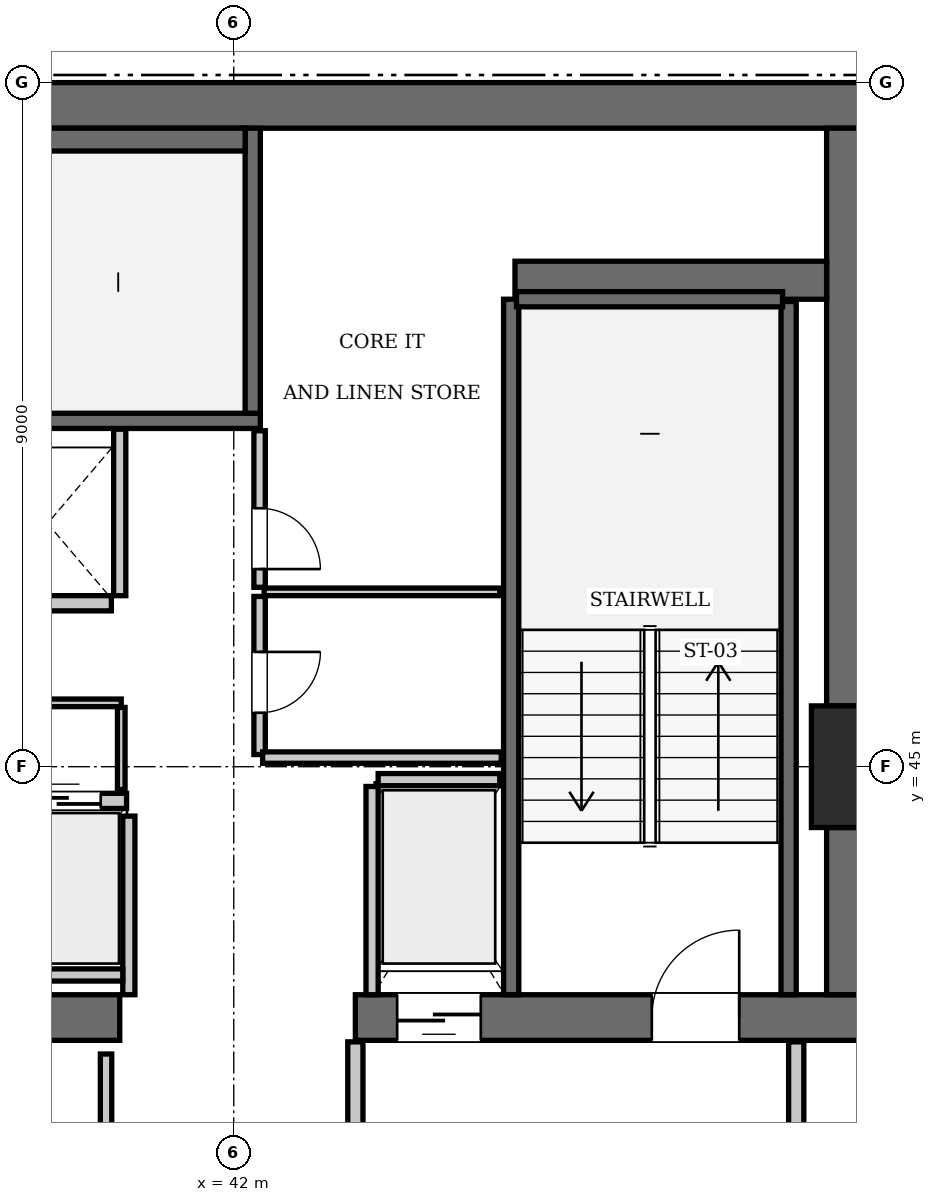
"""IFC4 building model, lengths in metres.
Left out: names, types, materials, properties, quantities, classifications, styles, units other than length and angle.
Written with IfcOpenShell. Run it as: python <this file> out.ifc"""

import sys

from ifc_helpers import new_model, si_unit, direction, frame, frame_2d, origin, origin_2d, place, context, subcontext, project, spatial, rectangle, extrude, element, fill, save


model = new_model("IFC4")
c1 = context("Model", 3, precision=1e-05, world=origin(), true_north=direction((0.0, 1.0)))
c2 = subcontext(c1, "Body", "Model", "MODEL_VIEW")
j1 = project(units=[si_unit("LENGTHUNIT", "METRE"), si_unit("PLANEANGLEUNIT", "RADIAN")], contexts=[c1])
p1 = place(None, origin())
s1 = spatial("IfcSite", under=j1, at=p1, CompositionType="ELEMENT")
p2 = place(p1, origin())
s2 = spatial("IfcBuilding", under=s1, at=p2, CompositionType="ELEMENT")
p3 = place(p2, frame((0.0, 0.0, 258.65)))
s3 = spatial("IfcBuildingStorey", under=s2, at=p3, CompositionType="ELEMENT", Elevation=258.65)
p4 = place(p3, frame((50.4, 45.0, 0.0), z_axis=(0.0, 0.0, 1.0), x_axis=(1.0, 0.0, 0.0)))
e1 = element("IfcColumn", 1, at=p4, inside=s3, PredefinedType="COLUMN", context=c2, shape_type="SweptSolid", body=[
    extrude(rectangle(XDim=1.6, YDim=1.6, at=origin_2d()), origin(), (0.0, 0.0, 1.0), 3.85),
])
p5 = place(p3, frame((25.2, 53.7, 0.0), z_axis=(0.0, 0.0, 1.0), x_axis=(1.0, 0.0, 0.0)))
e2 = element("IfcWall", 2, at=p5, inside=s3, PredefinedType="SHEAR", context=c2, shape_type="SweptSolid", body=[
    extrude(rectangle(XDim=25.2, YDim=0.6, at=frame_2d((12.6, 0.0))), origin(), (0.0, 0.0, 1.0), 3.85),
])
p6 = place(p3, frame((35.1, 41.7, 0.0), z_axis=(0.0, 0.0, 1.0), x_axis=(1.0, 0.0, 0.0)))
e3 = element("IfcWall", 3, at=p6, inside=s3, PredefinedType="SHEAR", context=c2, shape_type="SweptSolid", body=[
    extrude(rectangle(XDim=5.4, YDim=0.6, at=frame_2d((2.7, 0.0))), origin(), (0.0, 0.0, 1.0), 3.85),
])
p7 = place(p3, frame((43.6, 41.7, 0.0), z_axis=(0.0, 0.0, 1.0), x_axis=(1.0, 0.0, 0.0)))
e4 = element("IfcWall", 4, at=p7, inside=s3, PredefinedType="SHEAR", context=c2, shape_type="SweptSolid", body=[
    extrude(rectangle(XDim=6.8, YDim=0.6, at=frame_2d((3.4, 0.0))), origin(), (0.0, 0.0, 1.0), 3.85),
])
p8 = place(p7, frame((3.9, 0.0, 0.0)))
e5 = element("IfcOpeningElement", 5, at=p8, cuts=e4, PredefinedType="OPENING", context=c2, shape_type="SweptSolid", body=[
    extrude(rectangle(XDim=1.15, YDim=2.15, at=frame_2d((0.575, 1.075))), frame((0.0, 0.31, 0.0), z_axis=(0.0, -1.0, 0.0), x_axis=(1.0, 0.0, 0.0)), (0.0, 0.0, 1.0), 0.62),
])
p9 = place(p7, frame((0.55, 0.0, 0.0)))
e6 = element("IfcOpeningElement", 6, at=p9, cuts=e4, PredefinedType="OPENING", context=c2, shape_type="SweptSolid", body=[
    extrude(rectangle(XDim=1.1, YDim=2.2, at=frame_2d((0.55, 1.1))), frame((0.0, 0.31, 0.0), z_axis=(0.0, -1.0, 0.0), x_axis=(1.0, 0.0, 0.0)), (0.0, 0.0, 1.0), 0.62),
])
p10 = place(p3, frame((50.1, 42.0, 0.0), z_axis=(0.0, 0.0, 1.0), x_axis=(0.0, 1.0, 0.0)))
e7 = element("IfcWall", 7, at=p10, inside=s3, PredefinedType="SHEAR", context=c2, shape_type="SweptSolid", body=[
    extrude(rectangle(XDim=2.2, YDim=0.6, at=frame_2d((1.1, 0.0))), origin(), (0.0, 0.0, 1.0), 3.85),
])
p11 = place(p3, frame((50.1, 45.8, 0.0), z_axis=(0.0, 0.0, 1.0), x_axis=(0.0, 1.0, 0.0)))
e8 = element("IfcWall", 8, at=p11, inside=s3, PredefinedType="SHEAR", context=c2, shape_type="SweptSolid", body=[
    extrude(rectangle(XDim=7.6, YDim=0.6, at=frame_2d((3.8, 0.0))), origin(), (0.0, 0.0, 1.0), 3.85),
])
p12 = place(p3, frame((45.7, 51.4, 0.0), z_axis=(0.0, 0.0, 1.0), x_axis=(1.0, 0.0, 0.0)))
e9 = element("IfcWall", 9, at=p12, inside=s3, PredefinedType="SHEAR", context=c2, shape_type="SweptSolid", body=[
    extrude(rectangle(XDim=4.1, YDim=0.5, at=frame_2d((2.05, 0.0))), origin(), (0.0, 0.0, 1.0), 3.85),
])
p13 = place(p3, frame((33.25, 49.55, 0.0), z_axis=(0.0, 0.0, 1.0), x_axis=(1.0, 0.0, 0.0)))
e10 = element("IfcWall", 10, at=p13, inside=s3, PredefinedType="SOLIDWALL", context=c2, shape_type="SweptSolid", body=[
    extrude(rectangle(XDim=9.1, YDim=0.2, at=frame_2d((4.55, 0.0))), origin(), (0.0, 0.0, 1.0), 3.61),
])
p14 = place(p3, frame((42.25, 49.65, 0.0), z_axis=(0.0, 0.0, 1.0), x_axis=(0.0, 1.0, 0.0)))
e11 = element("IfcWall", 11, at=p14, inside=s3, PredefinedType="SOLIDWALL", context=c2, shape_type="SweptSolid", body=[
    extrude(rectangle(XDim=3.75, YDim=0.2, at=frame_2d((1.875, 0.0))), origin(), (0.0, 0.0, 1.0), 3.61),
])
p15 = place(p3, frame((33.45, 53.25, 0.0), z_axis=(0.0, 0.0, 1.0), x_axis=(1.0, 0.0, 0.0)))
e12 = element("IfcWall", 12, at=p15, inside=s3, PredefinedType="SOLIDWALL", context=c2, shape_type="SweptSolid", body=[
    extrude(rectangle(XDim=8.7, YDim=0.3, at=frame_2d((4.35, 0.0))), origin(), (0.0, 0.0, 1.0), 3.61),
])
p16 = place(p3, frame((45.65, 42.0, 0.0), z_axis=(0.0, 0.0, 1.0), x_axis=(0.0, 1.0, 0.0)))
e13 = element("IfcWall", 13, at=p16, inside=s3, PredefinedType="SOLIDWALL", context=c2, shape_type="SweptSolid", body=[
    extrude(rectangle(XDim=9.15, YDim=0.2, at=frame_2d((4.575, 0.0))), origin(), (0.0, 0.0, 1.0), 3.61),
])
p17 = place(p3, frame((49.3, 42.0, 0.0), z_axis=(0.0, 0.0, 1.0), x_axis=(0.0, 1.0, 0.0)))
e14 = element("IfcWall", 14, at=p17, inside=s3, PredefinedType="SOLIDWALL", context=c2, shape_type="SweptSolid", body=[
    extrude(rectangle(XDim=9.12, YDim=0.2, at=frame_2d((4.56, 0.0))), origin(), (0.0, 0.0, 1.0), 3.61),
])
p18 = place(p3, frame((45.72, 51.15, 0.0), z_axis=(0.0, 0.0, 1.0), x_axis=(1.0, 0.0, 0.0)))
e15 = element("IfcWall", 15, at=p18, inside=s3, PredefinedType="SOLIDWALL", context=c2, shape_type="SweptSolid", body=[
    extrude(rectangle(XDim=3.5, YDim=0.2, at=frame_2d((1.75, 0.0))), origin(), (0.0, 0.0, 1.0), 3.61),
])
p19 = place(p3, frame((38.91, 44.55, 0.0), z_axis=(0.0, 0.0, 1.0), x_axis=(1.0, 0.0, 0.0)))
e16 = element("IfcWall", 16, at=p19, inside=s3, PredefinedType="SOLIDWALL", context=c2, shape_type="SweptSolid", body=[
    extrude(rectangle(XDim=1.68, YDim=0.2, at=frame_2d((0.84, 0.0))), origin(), (0.0, 0.0, 1.0), 3.61),
])
p20 = place(p19, frame((0.34, 0.0, 0.0)))
e17 = element("IfcOpeningElement", 17, at=p20, cuts=e16, PredefinedType="OPENING", context=c2, shape_type="SweptSolid", body=[
    extrude(rectangle(XDim=1.0, YDim=2.15, at=frame_2d((0.5, 1.075))), frame((0.0, 0.11, 0.0), z_axis=(0.0, -1.0, 0.0), x_axis=(1.0, 0.0, 0.0)), (0.0, 0.0, 1.0), 0.22),
])
p21 = place(p3, frame((38.71, 47.15, 0.0), z_axis=(0.0, 0.0, 1.0), x_axis=(1.0, 0.0, 0.0)))
e18 = element("IfcWall", 18, at=p21, inside=s3, PredefinedType="SOLIDWALL", context=c2, shape_type="SweptSolid", body=[
    extrude(rectangle(XDim=1.68, YDim=0.2, at=frame_2d((0.84, 0.0))), origin(), (0.0, 0.0, 1.0), 3.61),
])
p22 = place(p3, frame((43.9, 44.83, 0.0), z_axis=(0.0, 0.0, 1.0), x_axis=(1.0, 0.0, 0.0)))
e19 = element("IfcWall", 19, at=p22, inside=s3, PredefinedType="SOLIDWALL", context=c2, shape_type="SweptSolid", body=[
    extrude(rectangle(XDim=1.6, YDim=0.16, at=frame_2d((0.8, 0.0))), origin(), (0.0, 0.0, 1.0), 3.61),
])
p23 = place(p3, frame((43.82, 42.0, 0.0), z_axis=(0.0, 0.0, 1.0), x_axis=(0.0, 1.0, 0.0)))
e20 = element("IfcWall", 20, at=p23, inside=s3, PredefinedType="SOLIDWALL", context=c2, shape_type="SweptSolid", body=[
    extrude(rectangle(XDim=2.74, YDim=0.16, at=frame_2d((1.37, 0.0))), origin(), (0.0, 0.0, 1.0), 3.61),
])
p24 = place(p3, frame((40.62, 42.0, 0.0), z_axis=(0.0, 0.0, 1.0), x_axis=(0.0, 1.0, 0.0)))
e21 = element("IfcWall", 21, at=p24, inside=s3, PredefinedType="SOLIDWALL", context=c2, shape_type="SweptSolid", body=[
    extrude(rectangle(XDim=2.35, YDim=0.16, at=frame_2d((1.175, 0.0))), origin(), (0.0, 0.0, 1.0), 3.61),
])
p25 = place(p3, frame((35.52, 42.26, 0.0), z_axis=(0.0, 0.0, 1.0), x_axis=(1.0, 0.0, 0.0)))
e22 = element("IfcWall", 22, at=p25, inside=s3, PredefinedType="SOLIDWALL", context=c2, shape_type="SweptSolid", body=[
    extrude(rectangle(XDim=5.02, YDim=0.16, at=frame_2d((2.51, 0.0))), origin(), (0.0, 0.0, 1.0), 3.61),
])
p26 = place(p3, frame((40.5, 47.25, 0.0), z_axis=(0.0, 0.0, 1.0), x_axis=(0.0, 1.0, 0.0)))
e23 = element("IfcWall", 23, at=p26, inside=s3, PredefinedType="SOLIDWALL", context=c2, shape_type="SweptSolid", body=[
    extrude(rectangle(XDim=2.19, YDim=0.16, at=frame_2d((1.095, 0.0))), origin(), (0.0, 0.0, 1.0), 3.61),
])
for number, where, z_axis, x_axis in (
    (24, (43.6, 38.31, 0.0), (0.0, 0.0, 1.0), (0.0, 1.0, 0.0)),
    (25, (49.4, 38.31, 0.0), (0.0, 0.0, 1.0), (0.0, 1.0, 0.0)),
):
    element("IfcWall", number, at=place(p3, frame(where, z_axis=z_axis, x_axis=x_axis)), inside=s3, PredefinedType="PARTITIONING", context=c2, shape_type="SweptSolid", body=[
        extrude(rectangle(XDim=3.07, YDim=0.2, at=frame_2d((1.535, 0.0))), origin(), (0.0, 0.0, 1.0), 3.61),
    ])
p27 = place(p3, frame((35.58, 45.84, 0.0), z_axis=(0.0, 0.0, 1.0), x_axis=(1.0, 0.0, 0.0)))
e26 = element("IfcWall", 26, at=p27, inside=s3, PredefinedType="PARTITIONING", context=c2, shape_type="SweptSolid", body=[
    extrude(rectangle(XDim=4.94, YDim=0.1, at=frame_2d((2.47, 0.0))), origin(), (0.0, 0.0, 1.0), 3.61),
])
p28 = place(p27, frame((1.8, 0.0, 0.0)))
e27 = element("IfcOpeningElement", 27, at=p28, cuts=e26, PredefinedType="OPENING", context=c2, shape_type="SweptSolid", body=[
    extrude(rectangle(XDim=0.8, YDim=2.05, at=frame_2d((0.4, 1.025))), frame((0.0, 0.06, 0.0), z_axis=(0.0, -1.0, 0.0), x_axis=(1.0, 0.0, 0.0)), (0.0, 0.0, 1.0), 0.12),
])
p29 = place(p3, frame((40.52, 44.7, 0.0), z_axis=(0.0, 0.0, 1.0), x_axis=(0.0, 1.0, 0.0)))
e28 = element("IfcWall", 28, at=p29, inside=s3, PredefinedType="PARTITIONING", context=c2, shape_type="SweptSolid", body=[
    extrude(rectangle(XDim=1.08, YDim=0.1, at=frame_2d((0.54, 0.0))), origin(), (0.0, 0.0, 1.0), 3.61),
])
p30 = place(p3, frame((42.34, 45.16, 0.0), z_axis=(0.0, 0.0, 1.0), x_axis=(0.0, 1.0, 0.0)))
e29 = element("IfcWall", 29, at=p30, inside=s3, PredefinedType="PARTITIONING", context=c2, shape_type="SweptSolid", body=[
    extrude(rectangle(XDim=2.08, YDim=0.15, at=frame_2d((1.04, 0.0))), origin(), (0.0, 0.0, 1.0), 3.61),
])
p31 = place(p30, frame((0.55, 0.0, 0.0)))
e30 = element("IfcOpeningElement", 30, at=p31, cuts=e29, PredefinedType="OPENING", context=c2, shape_type="SweptSolid", body=[
    extrude(rectangle(XDim=0.8, YDim=2.05, at=frame_2d((0.4, 1.025))), frame((0.0, 0.085, 0.0), z_axis=(0.0, -1.0, 0.0), x_axis=(1.0, 0.0, 0.0)), (0.0, 0.0, 1.0), 0.17),
])
p32 = place(p3, frame((42.34, 47.36, 0.0), z_axis=(0.0, 0.0, 1.0), x_axis=(0.0, 1.0, 0.0)))
e31 = element("IfcWall", 31, at=p32, inside=s3, PredefinedType="PARTITIONING", context=c2, shape_type="SweptSolid", body=[
    extrude(rectangle(XDim=2.06, YDim=0.15, at=frame_2d((1.03, 0.0))), origin(), (0.0, 0.0, 1.0), 3.61),
])
p33 = place(p32, frame((0.24, 0.0, 0.0)))
e32 = element("IfcOpeningElement", 32, at=p33, cuts=e31, PredefinedType="OPENING", context=c2, shape_type="SweptSolid", body=[
    extrude(rectangle(XDim=0.8, YDim=2.05, at=frame_2d((0.4, 1.025))), frame((0.0, 0.085, 0.0), z_axis=(0.0, -1.0, 0.0), x_axis=(1.0, 0.0, 0.0)), (0.0, 0.0, 1.0), 0.17),
])
p34 = place(p3, frame((42.4, 47.3, 0.0), z_axis=(0.0, 0.0, 1.0), x_axis=(1.0, 0.0, 0.0)))
e33 = element("IfcWall", 33, at=p34, inside=s3, PredefinedType="PARTITIONING", context=c2, shape_type="SweptSolid", body=[
    extrude(rectangle(XDim=3.1, YDim=0.1, at=frame_2d((1.55, 0.0))), origin(), (0.0, 0.0, 1.0), 3.61),
])
p35 = place(p3, frame((42.38, 45.12, 0.0), z_axis=(0.0, 0.0, 1.0), x_axis=(1.0, 0.0, 0.0)))
e34 = element("IfcWall", 34, at=p35, inside=s3, PredefinedType="PARTITIONING", context=c2, shape_type="SweptSolid", body=[
    extrude(rectangle(XDim=3.14, YDim=0.15, at=frame_2d((1.57, 0.0))), origin(), (0.0, 0.0, 1.0), 3.61),
])
p36 = place(p3, frame((40.32, 38.38, 0.0), z_axis=(0.0, 0.0, 1.0), x_axis=(0.0, 1.0, 0.0)))
e35 = element("IfcWall", 35, at=p36, inside=s3, PredefinedType="PARTITIONING", context=c2, shape_type="SweptSolid", body=[
    extrude(rectangle(XDim=2.84, YDim=0.15, at=frame_2d((1.42, 0.0))), origin(), (0.0, 0.0, 1.0), 3.61),
])
p37 = place(p8, origin())
e36 = element("IfcDoor", 36, at=p37, inside=s3, OperationType="SINGLE_SWING_RIGHT", PredefinedType="DOOR", context=c2, shape_type="SweptSolid", body=[
    extrude(rectangle(XDim=1.15, YDim=2.15, at=frame_2d((0.575, 1.075))), frame((0.0, 0.025, 0.0), z_axis=(0.0, -1.0, 0.0), x_axis=(1.0, 0.0, 0.0)), (0.0, 0.0, 1.0), 0.05),
])
fill(e5, e36)
p38 = place(p20, origin())
e37 = element("IfcDoor", 37, at=p38, inside=s3, OperationType="SLIDING_TO_LEFT", PredefinedType="DOOR", context=c2, shape_type="SweptSolid", body=[
    extrude(rectangle(XDim=1.0, YDim=2.15, at=frame_2d((0.5, 1.075))), frame((0.0, 0.025, 0.0), z_axis=(0.0, -1.0, 0.0), x_axis=(1.0, 0.0, 0.0)), (0.0, 0.0, 1.0), 0.05),
])
fill(e17, e37)
p39 = place(p9, frame((1.1, 0.0, 0.0), z_axis=(0.0, 0.0, 1.0), x_axis=(-1.0, 0.0, 0.0)))
e38 = element("IfcDoor", 38, at=p39, inside=s3, OperationType="SLIDING_TO_LEFT", PredefinedType="DOOR", context=c2, shape_type="SweptSolid", body=[
    extrude(rectangle(XDim=1.1, YDim=2.2, at=frame_2d((0.55, 1.1))), frame((0.0, 0.025, 0.0), z_axis=(0.0, -1.0, 0.0), x_axis=(1.0, 0.0, 0.0)), (0.0, 0.0, 1.0), 0.05),
])
fill(e6, e38)
p40 = place(p31, frame((0.8, 0.0, 0.0), z_axis=(0.0, 0.0, 1.0), x_axis=(-1.0, 0.0, 0.0)))
e39 = element("IfcDoor", 39, at=p40, inside=s3, OperationType="SINGLE_SWING_LEFT", PredefinedType="DOOR", context=c2, shape_type="SweptSolid", body=[
    extrude(rectangle(XDim=0.8, YDim=2.05, at=frame_2d((0.4, 1.025))), frame((0.0, 0.025, 0.0), z_axis=(0.0, -1.0, 0.0), x_axis=(1.0, 0.0, 0.0)), (0.0, 0.0, 1.0), 0.05),
])
fill(e30, e39)
p41 = place(p33, frame((0.8, 0.0, 0.0), z_axis=(0.0, 0.0, 1.0), x_axis=(-1.0, 0.0, 0.0)))
e40 = element("IfcDoor", 40, at=p41, inside=s3, OperationType="SINGLE_SWING_RIGHT", PredefinedType="DOOR", context=c2, shape_type="SweptSolid", body=[
    extrude(rectangle(XDim=0.8, YDim=2.05, at=frame_2d((0.4, 1.025))), frame((0.0, 0.025, 0.0), z_axis=(0.0, -1.0, 0.0), x_axis=(1.0, 0.0, 0.0)), (0.0, 0.0, 1.0), 0.05),
])
fill(e32, e40)
save(model, sys.argv[1])
